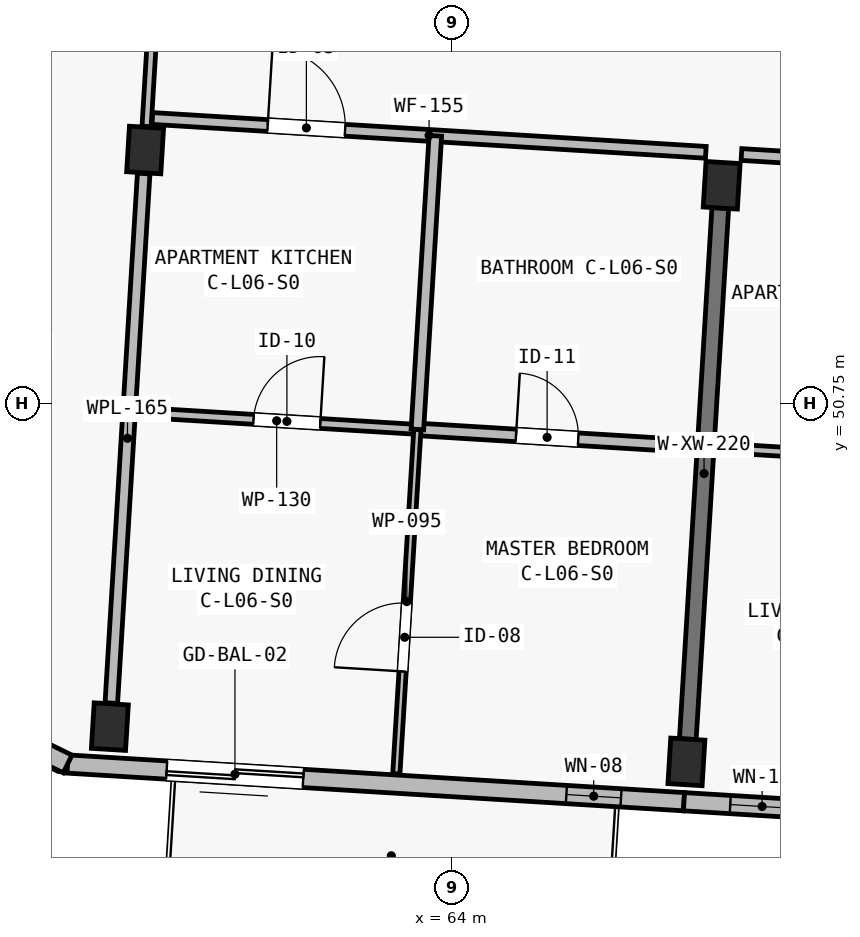
"""IFC4 building model, lengths in metres.
Left out: names, types, materials, properties, quantities, classifications, styles, units other than length and angle.
Written with IfcOpenShell. Run it as: python <this file> out.ifc"""

import sys

from ifc_helpers import new_model, si_unit, direction, frame, frame_2d, origin, origin_2d, place, context, subcontext, project, spatial, rectangle, extrude, element, fill, save


model = new_model("IFC4")
c1 = context("Model", 3, precision=1e-05, world=origin(), true_north=direction((0.0, 1.0)))
c2 = subcontext(c1, "Body", "Model", "MODEL_VIEW")
j1 = project(units=[si_unit("LENGTHUNIT", "METRE"), si_unit("PLANEANGLEUNIT", "RADIAN")], contexts=[c1])
p1 = place(None, origin())
s1 = spatial("IfcSite", under=j1, at=p1, CompositionType="ELEMENT")
p2 = place(p1, origin())
s2 = spatial("IfcBuilding", under=s1, at=p2, CompositionType="ELEMENT")
p3 = place(p2, frame((0.0, 0.0, 21.4)))
s3 = spatial("IfcBuildingStorey", under=s2, at=p3, CompositionType="ELEMENT", Elevation=21.4)
for number, where, z_axis, x_axis in (
    (1, (59.5, 46.5, 0.0), (0.0, 0.0, 1.0), (0.998, -0.061, 0.0)),
    (2, (59.964, 54.086, 0.0), (0.0, 0.0, 1.0), (0.998, -0.061, 0.0)),
    (3, (67.086, 46.036, 0.0), (0.0, 0.0, 1.0), (0.998, -0.061, 0.0)),
    (4, (67.55, 53.622, 0.0), (0.0, 0.0, 1.0), (0.998, -0.061, 0.0)),
):
    element("IfcColumn", number, at=place(p3, frame(where, z_axis=z_axis, x_axis=x_axis)), inside=s3, PredefinedType="COLUMN", context=c2, shape_type="SweptSolid", body=[
        extrude(rectangle(XDim=0.45, YDim=0.6, at=origin_2d()), origin(), (0.0, 0.0, 1.0), 3.25),
    ])
p4 = place(p3, frame((67.104, 46.335, 0.0), z_axis=(0.0, 0.0, 1.0), x_axis=(0.061034188237, 0.998135676081, 0.0)))
e5 = element("IfcWall", 5, at=p4, inside=s3, PredefinedType="SHEAR", context=c2, shape_type="SweptSolid", body=[
    extrude(rectangle(XDim=7.0, YDim=0.22, at=frame_2d((3.5, 0.0))), origin(), (0.0, 0.0, 1.0), 2.5),
])
p5 = place(p3, frame((67.054, 45.512, 0.0), z_axis=(0.0, 0.0, 1.0), x_axis=(-0.998134248939, 0.061057522844, 0.0)))
e6 = element("IfcWall", 6, at=p5, inside=s3, PredefinedType="SOLIDWALL", context=c2, shape_type="SweptSolid", body=[
    extrude(rectangle(XDim=8.125, YDim=0.24, at=frame_2d((4.062, 0.0))), origin(), (0.0, 0.0, 1.0), 3.0),
])
p6 = place(p5, frame((5.019, 0.0, 0.0)))
e7 = element("IfcOpeningElement", 7, at=p6, cuts=e6, PredefinedType="OPENING", context=c2, shape_type="SweptSolid", body=[
    extrude(rectangle(XDim=1.8, YDim=2.12, at=frame_2d((0.9, 1.06))), frame((0.0, 0.135, 0.0), z_axis=(0.0, -1.0, 0.0), x_axis=(1.0, 0.0, 0.0)), (0.0, 0.0, 1.0), 0.27),
])
p7 = place(p5, frame((0.83, 0.0, 0.42)))
e8 = element("IfcOpeningElement", 8, at=p7, cuts=e6, PredefinedType="OPENING", context=c2, shape_type="SweptSolid", body=[
    extrude(rectangle(XDim=0.72, YDim=2.16, at=frame_2d((0.36, 1.08))), frame((0.0, 0.135, 0.0), z_axis=(0.0, -1.0, 0.0), x_axis=(1.0, 0.0, 0.0)), (0.0, 0.0, 1.0), 0.27),
])
p8 = place(p3, frame((74.64, 45.048, 0.0), z_axis=(0.0, 0.0, 1.0), x_axis=(-0.998135669243, 0.061034300063, 0.0)))
e9 = element("IfcWall", 9, at=p8, inside=s3, PredefinedType="SOLIDWALL", context=c2, shape_type="SweptSolid", body=[
    extrude(rectangle(XDim=7.6, YDim=0.24, at=frame_2d((3.8, 0.0))), origin(), (0.0, 0.0, 1.0), 3.0),
])
p9 = place(p8, frame((1.781, 0.0, 0.48)))
e10 = element("IfcOpeningElement", 10, at=p9, cuts=e9, PredefinedType="OPENING", context=c2, shape_type="SweptSolid", body=[
    extrude(rectangle(XDim=0.76, YDim=2.34, at=frame_2d((0.38, 1.17))), frame((0.0, 0.135, 0.0), z_axis=(0.0, -1.0, 0.0), x_axis=(1.0, 0.0, 0.0)), (0.0, 0.0, 1.0), 0.27),
])
p10 = place(p8, frame((4.848, 0.0, 0.48)))
e11 = element("IfcOpeningElement", 11, at=p10, cuts=e9, PredefinedType="OPENING", context=c2, shape_type="SweptSolid", body=[
    extrude(rectangle(XDim=0.82, YDim=2.18, at=frame_2d((0.41, 1.09))), frame((0.0, 0.135, 0.0), z_axis=(0.0, -1.0, 0.0), x_axis=(1.0, 0.0, 0.0)), (0.0, 0.0, 1.0), 0.27),
])
p11 = place(p8, frame((6.15, 0.0, 0.52)))
e12 = element("IfcOpeningElement", 12, at=p11, cuts=e9, PredefinedType="OPENING", context=c2, shape_type="SweptSolid", body=[
    extrude(rectangle(XDim=0.84, YDim=2.28, at=frame_2d((0.42, 1.14))), frame((0.0, 0.135, 0.0), z_axis=(0.0, -1.0, 0.0), x_axis=(1.0, 0.0, 0.0)), (0.0, 0.0, 1.0), 0.27),
])
p12 = place(p3, frame((58.944, 46.008, 0.0), z_axis=(0.0, 0.0, 1.0), x_axis=(-0.897775054318, 0.440454256246, 0.0)))
e13 = element("IfcWall", 13, at=p12, inside=s3, PredefinedType="SOLIDWALL", context=c2, shape_type="SweptSolid", body=[
    extrude(rectangle(XDim=8.12, YDim=0.26, at=frame_2d((4.06, 0.0))), origin(), (0.0, 0.0, 1.0), 3.0),
])
p13 = place(p12, frame((2.81, 0.0, 0.45)))
e14 = element("IfcOpeningElement", 14, at=p13, cuts=e13, PredefinedType="OPENING", context=c2, shape_type="SweptSolid", body=[
    extrude(rectangle(XDim=0.58, YDim=2.16, at=frame_2d((0.29, 1.08))), frame((0.0, 0.145, 0.0), z_axis=(0.0, -1.0, 0.0), x_axis=(1.0, 0.0, 0.0)), (0.0, 0.0, 1.0), 0.29),
])
p14 = place(p12, frame((4.59, 0.0, 0.52)))
e15 = element("IfcOpeningElement", 15, at=p14, cuts=e13, PredefinedType="OPENING", context=c2, shape_type="SweptSolid", body=[
    extrude(rectangle(XDim=0.72, YDim=2.16, at=frame_2d((0.36, 1.08))), frame((0.0, 0.145, 0.0), z_axis=(0.0, -1.0, 0.0), x_axis=(1.0, 0.0, 0.0)), (0.0, 0.0, 1.0), 0.29),
])
p15 = place(p3, frame((51.654, 49.585, 0.0), z_axis=(0.0, 0.0, 1.0), x_axis=(0.448621989068, 0.893721607059, 0.0)))
e16 = element("IfcWall", 16, at=p15, inside=s3, PredefinedType="SOLIDWALL", context=c2, shape_type="SweptSolid", body=[
    extrude(rectangle(XDim=19.061, YDim=0.26, at=frame_2d((9.53, 0.0))), origin(), (0.0, 0.0, 1.0), 3.0),
])
p16 = place(p15, frame((2.81, 0.0, 0.45)))
e17 = element("IfcOpeningElement", 17, at=p16, cuts=e16, PredefinedType="OPENING", context=c2, shape_type="SweptSolid", body=[
    extrude(rectangle(XDim=0.58, YDim=2.16, at=frame_2d((0.29, 1.08))), frame((0.0, 0.145, 0.0), z_axis=(0.0, -1.0, 0.0), x_axis=(1.0, 0.0, 0.0)), (0.0, 0.0, 1.0), 0.29),
])
p17 = place(p15, frame((15.531, 0.0, 0.52)))
e18 = element("IfcOpeningElement", 18, at=p17, cuts=e16, PredefinedType="OPENING", context=c2, shape_type="SweptSolid", body=[
    extrude(rectangle(XDim=0.72, YDim=2.16, at=frame_2d((0.36, 1.08))), frame((0.0, 0.145, 0.0), z_axis=(0.0, -1.0, 0.0), x_axis=(1.0, 0.0, 0.0)), (0.0, 0.0, 1.0), 0.29),
])
p18 = place(p3, frame((59.983, 54.395, 0.0), z_axis=(0.0, 0.0, 1.0), x_axis=(0.061035211258, 0.998135613525, 0.0)))
e19 = element("IfcWall", 19, at=p18, inside=s3, PredefinedType="PARTITIONING", context=c2, shape_type="SweptSolid", body=[
    extrude(rectangle(XDim=3.78, YDim=0.12, at=frame_2d((1.89, 0.0))), origin(), (0.0, 0.0, 1.0), 2.5),
])
p19 = place(p18, frame((1.35, 0.0, 0.0)))
e20 = element("IfcOpeningElement", 20, at=p19, cuts=e19, PredefinedType="OPENING", context=c2, shape_type="SweptSolid", body=[
    extrude(rectangle(XDim=0.9, YDim=2.1, at=frame_2d((0.45, 1.05))), frame((0.0, 0.075, 0.0), z_axis=(0.0, -1.0, 0.0), x_axis=(1.0, 0.0, 0.0)), (0.0, 0.0, 1.0), 0.15),
])
p20 = place(p3, frame((59.519, 46.809, 0.0), z_axis=(0.0, 0.0, 1.0), x_axis=(0.061034681366, 0.998135645927, 0.0)))
e21 = element("IfcWall", 21, at=p20, inside=s3, PredefinedType="PLUMBINGWALL", context=c2, shape_type="SweptSolid", body=[
    extrude(rectangle(XDim=6.98, YDim=0.165, at=frame_2d((3.49, 0.0))), origin(), (0.0, 0.0, 1.0), 2.5),
])
p21 = place(p3, frame((60.06, 54.501, 0.0), z_axis=(0.0, 0.0, 1.0), x_axis=(0.998135030865, -0.061044739012, 0.0)))
e22 = element("IfcWall", 22, at=p21, inside=s3, PredefinedType="PARTITIONING", context=c2, shape_type="SweptSolid", body=[
    extrude(rectangle(XDim=7.295, YDim=0.155, at=frame_2d((3.647, 0.0))), origin(), (0.0, 0.0, 1.0), 2.97),
])
p22 = place(p21, frame((1.52, 0.0, 0.0)))
e23 = element("IfcOpeningElement", 23, at=p22, cuts=e22, PredefinedType="OPENING", context=c2, shape_type="SweptSolid", body=[
    extrude(rectangle(XDim=1.02, YDim=2.2, at=frame_2d((0.51, 1.1))), frame((0.0, 0.093, 0.0), z_axis=(0.0, -1.0, 0.0), x_axis=(1.0, 0.0, 0.0)), (0.0, 0.0, 1.0), 0.185),
])
p23 = place(p3, frame((59.843, 50.637, 0.0), z_axis=(0.0, 0.0, 1.0), x_axis=(0.998133408508, -0.061071260176, 0.0)))
e24 = element("IfcWall", 24, at=p23, inside=s3, PredefinedType="PARTITIONING", context=c2, shape_type="SweptSolid", body=[
    extrude(rectangle(XDim=3.71, YDim=0.13, at=frame_2d((1.855, 0.0))), origin(), (0.0, 0.0, 1.0), 2.97),
])
p24 = place(p23, frame((1.55, 0.0, 0.0)))
e25 = element("IfcOpeningElement", 25, at=p24, cuts=e24, PredefinedType="OPENING", context=c2, shape_type="SweptSolid", body=[
    extrude(rectangle(XDim=0.88, YDim=2.1, at=frame_2d((0.44, 1.05))), frame((0.0, 0.08, 0.0), z_axis=(0.0, -1.0, 0.0), x_axis=(1.0, 0.0, 0.0)), (0.0, 0.0, 1.0), 0.16),
])
p25 = place(p3, frame((63.546, 50.41, 0.0), z_axis=(0.0, 0.0, 1.0), x_axis=(0.998136719672, -0.061017119263, 0.0)))
e26 = element("IfcWall", 26, at=p25, inside=s3, PredefinedType="PLUMBINGWALL", context=c2, shape_type="SweptSolid", body=[
    extrude(rectangle(XDim=3.685, YDim=0.165, at=frame_2d((1.843, 0.0))), origin(), (0.0, 0.0, 1.0), 2.97),
])
p26 = place(p25, frame((1.3, 0.0, 0.0)))
e27 = element("IfcOpeningElement", 27, at=p26, cuts=e26, PredefinedType="OPENING", context=c2, shape_type="SweptSolid", body=[
    extrude(rectangle(XDim=0.82, YDim=2.08, at=frame_2d((0.41, 1.04))), frame((0.0, 0.097, 0.0), z_axis=(0.0, -1.0, 0.0), x_axis=(1.0, 0.0, 0.0)), (0.0, 0.0, 1.0), 0.195),
])
p27 = place(p3, frame((63.269, 45.879, 0.0), z_axis=(0.0, 0.0, 1.0), x_axis=(0.061035713941, 0.998135582786, 0.0)))
e28 = element("IfcWall", 28, at=p27, inside=s3, PredefinedType="PARTITIONING", context=c2, shape_type="SweptSolid", body=[
    extrude(rectangle(XDim=4.54, YDim=0.095, at=frame_2d((2.27, 0.0))), origin(), (0.0, 0.0, 1.0), 2.97),
])
p28 = place(p27, frame((1.35, 0.0, 0.0)))
e29 = element("IfcOpeningElement", 29, at=p28, cuts=e28, PredefinedType="OPENING", context=c2, shape_type="SweptSolid", body=[
    extrude(rectangle(XDim=0.9, YDim=2.1, at=frame_2d((0.45, 1.05))), frame((0.0, 0.062, 0.0), z_axis=(0.0, -1.0, 0.0), x_axis=(1.0, 0.0, 0.0)), (0.0, 0.0, 1.0), 0.125),
])
p29 = place(p3, frame((63.546, 50.41, 0.0), z_axis=(0.0, 0.0, 1.0), x_axis=(0.061066453301, 0.998133702608, 0.0)))
e30 = element("IfcWall", 30, at=p29, inside=s3, PredefinedType="PLUMBINGWALL", context=c2, shape_type="SweptSolid", body=[
    extrude(rectangle(XDim=3.87, YDim=0.165, at=frame_2d((1.935, 0.0))), origin(), (0.0, 0.0, 1.0), 2.97),
])
p30 = place(p3, frame((67.81, 54.027, 0.0), z_axis=(0.0, 0.0, 1.0), x_axis=(0.998136655722, -0.061018165369, 0.0)))
e31 = element("IfcWall", 31, at=p30, inside=s3, PredefinedType="PARTITIONING", context=c2, shape_type="SweptSolid", body=[
    extrude(rectangle(XDim=7.13, YDim=0.155, at=frame_2d((3.565, 0.0))), origin(), (0.0, 0.0, 1.0), 2.97),
])
p31 = place(p30, frame((1.355, 0.0, 0.0)))
e32 = element("IfcOpeningElement", 32, at=p31, cuts=e31, PredefinedType="OPENING", context=c2, shape_type="SweptSolid", body=[
    extrude(rectangle(XDim=0.98, YDim=2.15, at=frame_2d((0.49, 1.075))), frame((0.0, 0.093, 0.0), z_axis=(0.0, -1.0, 0.0), x_axis=(1.0, 0.0, 0.0)), (0.0, 0.0, 1.0), 0.185),
])
p32 = place(p3, frame((67.454, 50.171, 0.0), z_axis=(0.0, 0.0, 1.0), x_axis=(0.998132682596, -0.061083123148, 0.0)))
e33 = element("IfcWall", 33, at=p32, inside=s3, PredefinedType="PARTITIONING", context=c2, shape_type="SweptSolid", body=[
    extrude(rectangle(XDim=3.685, YDim=0.12, at=frame_2d((1.843, 0.0))), origin(), (0.0, 0.0, 1.0), 2.97),
])
p33 = place(p32, frame((1.525, 0.0, 0.0)))
e34 = element("IfcOpeningElement", 34, at=p33, cuts=e33, PredefinedType="OPENING", context=c2, shape_type="SweptSolid", body=[
    extrude(rectangle(XDim=0.9, YDim=2.1, at=frame_2d((0.45, 1.05))), frame((0.0, 0.075, 0.0), z_axis=(0.0, -1.0, 0.0), x_axis=(1.0, 0.0, 0.0)), (0.0, 0.0, 1.0), 0.15),
])
p34 = place(p6, origin())
e35 = element("IfcDoor", 35, at=p34, inside=s3, OperationType="SLIDING_TO_LEFT", PredefinedType="DOOR", context=c2, shape_type="SweptSolid", body=[
    extrude(rectangle(XDim=1.8, YDim=2.12, at=frame_2d((0.9, 1.06))), frame((0.0, 0.025, 0.0), z_axis=(0.0, -1.0, 0.0), x_axis=(1.0, 0.0, 0.0)), (0.0, 0.0, 1.0), 0.05),
])
fill(e7, e35)
p35 = place(p7, origin())
e36 = element("IfcWindow", 36, at=p35, inside=s3, PartitioningType="SINGLE_PANEL", PredefinedType="WINDOW", context=c2, shape_type="SweptSolid", body=[
    extrude(rectangle(XDim=0.72, YDim=2.16, at=frame_2d((0.36, 1.08))), frame((0.0, 0.03, 0.0), z_axis=(0.0, -1.0, 0.0), x_axis=(1.0, 0.0, 0.0)), (0.0, 0.0, 1.0), 0.06),
])
fill(e8, e36)
p36 = place(p11, origin())
e37 = element("IfcWindow", 37, at=p36, inside=s3, PartitioningType="SINGLE_PANEL", PredefinedType="WINDOW", context=c2, shape_type="SweptSolid", body=[
    extrude(rectangle(XDim=0.84, YDim=2.28, at=frame_2d((0.42, 1.14))), frame((0.0, 0.03, 0.0), z_axis=(0.0, -1.0, 0.0), x_axis=(1.0, 0.0, 0.0)), (0.0, 0.0, 1.0), 0.06),
])
fill(e12, e37)
p37 = place(p22, origin())
e38 = element("IfcDoor", 38, at=p37, inside=s3, OperationType="SINGLE_SWING_LEFT", PredefinedType="DOOR", context=c2, shape_type="SweptSolid", body=[
    extrude(rectangle(XDim=1.02, YDim=2.2, at=frame_2d((0.51, 1.1))), frame((0.0, 0.025, 0.0), z_axis=(0.0, -1.0, 0.0), x_axis=(1.0, 0.0, 0.0)), (0.0, 0.0, 1.0), 0.05),
])
fill(e23, e38)
p38 = place(p24, origin())
e39 = element("IfcDoor", 39, at=p38, inside=s3, OperationType="SINGLE_SWING_RIGHT", PredefinedType="DOOR", context=c2, shape_type="SweptSolid", body=[
    extrude(rectangle(XDim=0.88, YDim=2.1, at=frame_2d((0.44, 1.05))), frame((0.0, 0.025, 0.0), z_axis=(0.0, -1.0, 0.0), x_axis=(1.0, 0.0, 0.0)), (0.0, 0.0, 1.0), 0.05),
])
fill(e25, e39)
p39 = place(p26, origin())
e40 = element("IfcDoor", 40, at=p39, inside=s3, OperationType="SINGLE_SWING_LEFT", PredefinedType="DOOR", context=c2, shape_type="SweptSolid", body=[
    extrude(rectangle(XDim=0.82, YDim=2.08, at=frame_2d((0.41, 1.04))), frame((0.0, 0.025, 0.0), z_axis=(0.0, -1.0, 0.0), x_axis=(1.0, 0.0, 0.0)), (0.0, 0.0, 1.0), 0.05),
])
fill(e27, e40)
p40 = place(p28, origin())
e41 = element("IfcDoor", 41, at=p40, inside=s3, OperationType="SINGLE_SWING_LEFT", PredefinedType="DOOR", context=c2, shape_type="SweptSolid", body=[
    extrude(rectangle(XDim=0.9, YDim=2.1, at=frame_2d((0.45, 1.05))), frame((0.0, 0.025, 0.0), z_axis=(0.0, -1.0, 0.0), x_axis=(1.0, 0.0, 0.0)), (0.0, 0.0, 1.0), 0.05),
])
fill(e29, e41)
save(model, sys.argv[1])
